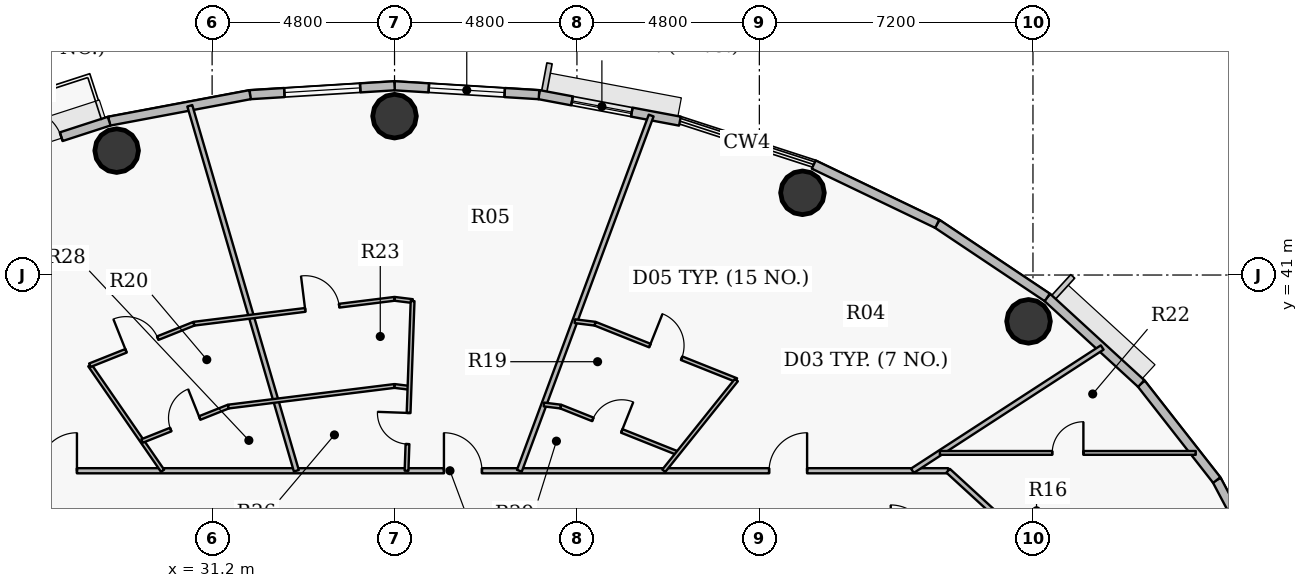
"""IFC4 building model, lengths in metres.
Left out: names, types, materials, properties, quantities, classifications, styles, units other than length and angle.
Written with IfcOpenShell. Run it as: python <this file> out.ifc"""

import sys

from ifc_helpers import new_model, si_unit, direction, frame, frame_2d, origin, origin_2d, place, context, subcontext, project, spatial, rectangle, hollow_circle, extrude, source, transform, mapped, element, fill, save


model = new_model("IFC4")
c1 = context("Model", 3, precision=1e-05, world=origin(), true_north=direction((0.0, 1.0)))
c2 = subcontext(c1, "Body", "Model", "MODEL_VIEW")
j1 = project(units=[si_unit("LENGTHUNIT", "METRE"), si_unit("PLANEANGLEUNIT", "RADIAN")], contexts=[c1])
p1 = place(None, origin())
s1 = spatial("IfcSite", under=j1, at=p1, CompositionType="ELEMENT")
p2 = place(p1, origin())
s2 = spatial("IfcBuilding", under=s1, at=p2, CompositionType="ELEMENT")
p3 = place(p2, frame((0.0, 0.0, 217.8)))
s3 = spatial("IfcBuildingStorey", under=s2, at=p3, CompositionType="ELEMENT", Elevation=217.8)
for number, where, z_axis, x_axis in (
    (1, (52.683, 39.781, 0.0), (0.0, 0.0, 1.0), (1.0, 0.0, 0.0)),
    (2, (46.735, 43.164, 0.0), (0.0, 0.0, 1.0), (1.0, 0.0, 0.0)),
    (3, (36.0, 45.18, 0.0), (0.0, 0.0, 1.0), (1.0, 0.0, 0.0)),
    (4, (28.688, 44.273, 0.0), (0.0, 0.0, 1.0), (1.0, 0.0, 0.0)),
):
    element("IfcColumn", number, at=place(p3, frame(where, z_axis=z_axis, x_axis=x_axis)), inside=s3, PredefinedType="COLUMN", context=c2, shape_type="SweptSolid", body=[
        extrude(hollow_circle(Radius=0.575, WallThickness=0.036, at=origin_2d()), origin(), (0.0, 0.0, 1.0), 3.75),
    ])
p4 = place(p3, frame((57.636, 35.605, 0.0), z_axis=(0.0, 0.0, 1.0), x_axis=(0.46766049993, -0.883908172157, 0.0)))
e5 = element("IfcWall", 5, at=p4, inside=s3, PredefinedType="SOLIDWALL", context=c2, shape_type="SweptSolid", body=[
    extrude(rectangle(XDim=3.11, YDim=0.24, at=frame_2d((1.555, 0.0))), origin(), (0.0, 0.0, 1.0), 3.5),
])
p5 = place(p3, frame((55.648, 38.145, 0.0), z_axis=(0.0, 0.0, 1.0), x_axis=(0.616312344705, -0.787501805562, 0.0)))
e6 = element("IfcWall", 6, at=p5, inside=s3, PredefinedType="SOLIDWALL", context=c2, shape_type="SweptSolid", body=[
    extrude(rectangle(XDim=3.225, YDim=0.24, at=frame_2d((1.612, 0.0))), origin(), (0.0, 0.0, 1.0), 3.5),
])
p6 = place(p3, frame((53.176, 40.411, 0.0), z_axis=(0.0, 0.0, 1.0), x_axis=(0.737123922599, -0.675757591694, 0.0)))
e7 = element("IfcWall", 7, at=p6, inside=s3, PredefinedType="SOLIDWALL", context=c2, shape_type="SweptSolid", body=[
    extrude(rectangle(XDim=3.354, YDim=0.24, at=frame_2d((1.677, 0.0))), origin(), (0.0, 0.0, 1.0), 3.5),
])
p7 = place(p3, frame((50.28, 42.348, 0.0), z_axis=(0.0, 0.0, 1.0), x_axis=(0.831262496074, -0.555880079352, 0.0)))
e8 = element("IfcWall", 8, at=p7, inside=s3, PredefinedType="SOLIDWALL", context=c2, shape_type="SweptSolid", body=[
    extrude(rectangle(XDim=3.484, YDim=0.24, at=frame_2d((1.742, 0.0))), origin(), (0.0, 0.0, 1.0), 3.5),
])
p8 = place(p3, frame((47.031, 43.906, 0.0), z_axis=(0.0, 0.0, 1.0), x_axis=(0.901598104751, -0.432574684313, 0.0)))
e9 = element("IfcWall", 9, at=p8, inside=s3, PredefinedType="SOLIDWALL", context=c2, shape_type="SweptSolid", body=[
    extrude(rectangle(XDim=3.604, YDim=0.24, at=frame_2d((1.802, 0.0))), origin(), (0.0, 0.0, 1.0), 3.5),
])
p9 = place(p3, frame((39.802, 45.746, 0.0), z_axis=(0.0, 0.0, 1.0), x_axis=(0.982784898575, -0.184753465822, 0.0)))
e10 = element("IfcWall", 10, at=p9, inside=s3, PredefinedType="SOLIDWALL", context=c2, shape_type="SweptSolid", body=[
    extrude(rectangle(XDim=3.773, YDim=0.24, at=frame_2d((1.886, 0.0))), origin(), (0.0, 0.0, 1.0), 3.5),
])
p10 = place(p9, frame((0.884, 0.0, 0.9)))
e11 = element("IfcOpeningElement", 11, at=p10, cuts=e10, PredefinedType="OPENING", context=c2, shape_type="SweptSolid", body=[
    extrude(rectangle(XDim=1.6, YDim=1.75, at=origin_2d()), frame((0.8, 0.13, 0.875), z_axis=(0.0, -1.0, 0.0), x_axis=(1.0, 0.0, 0.0)), (0.0, 0.0, 1.0), 0.26),
])
p11 = place(p3, frame((36.0, 45.98, 0.0), z_axis=(0.0, 0.0, 1.0), x_axis=(0.998108785312, -0.06147237333, 0.0)))
e12 = element("IfcWall", 12, at=p11, inside=s3, PredefinedType="SOLIDWALL", context=c2, shape_type="SweptSolid", body=[
    extrude(rectangle(XDim=3.809, YDim=0.24, at=frame_2d((1.904, 0.0))), origin(), (0.0, 0.0, 1.0), 3.5),
])
p12 = place(p11, frame((0.904, 0.0, 0.9)))
e13 = element("IfcOpeningElement", 13, at=p12, cuts=e12, PredefinedType="OPENING", context=c2, shape_type="SweptSolid", body=[
    extrude(rectangle(XDim=2.0, YDim=1.75, at=origin_2d()), frame((1.0, 0.13, 0.875), z_axis=(0.0, -1.0, 0.0), x_axis=(1.0, 0.0, 0.0)), (0.0, 0.0, 1.0), 0.26),
])
p13 = place(p3, frame((32.198, 45.746, 0.0), z_axis=(0.0, 0.0, 1.0), x_axis=(0.998108785312, 0.06147237333, 0.0)))
e14 = element("IfcWall", 14, at=p13, inside=s3, PredefinedType="SOLIDWALL", context=c2, shape_type="SweptSolid", body=[
    extrude(rectangle(XDim=3.809, YDim=0.24, at=frame_2d((1.904, 0.0))), origin(), (0.0, 0.0, 1.0), 3.5),
])
p14 = place(p13, frame((0.905, 0.0, 0.9)))
e15 = element("IfcOpeningElement", 15, at=p14, cuts=e14, PredefinedType="OPENING", context=c2, shape_type="SweptSolid", body=[
    extrude(rectangle(XDim=2.0, YDim=1.75, at=origin_2d()), frame((1.0, 0.13, 0.875), z_axis=(0.0, -1.0, 0.0), x_axis=(1.0, 0.0, 0.0)), (0.0, 0.0, 1.0), 0.26),
])
p15 = place(p3, frame((28.491, 45.049, 0.0), z_axis=(0.0, 0.0, 1.0), x_axis=(0.982784898575, 0.184753465822, 0.0)))
e16 = element("IfcWall", 16, at=p15, inside=s3, PredefinedType="SOLIDWALL", context=c2, shape_type="SweptSolid", body=[
    extrude(rectangle(XDim=3.773, YDim=0.24, at=frame_2d((1.886, 0.0))), origin(), (0.0, 0.0, 1.0), 3.5),
])
p16 = place(p3, frame((24.969, 43.906, 0.0), z_axis=(0.0, 0.0, 1.0), x_axis=(0.951210789182, 0.308541787354, 0.0)))
e17 = element("IfcWall", 17, at=p16, inside=s3, PredefinedType="SOLIDWALL", context=c2, shape_type="SweptSolid", body=[
    extrude(rectangle(XDim=3.702, YDim=0.24, at=frame_2d((1.851, 0.0))), origin(), (0.0, 0.0, 1.0), 3.5),
])
p17 = place(p16, frame((1.326, 0.0, 0.0)))
e18 = element("IfcOpeningElement", 18, at=p17, cuts=e17, PredefinedType="OPENING", context=c2, shape_type="SweptSolid", body=[
    extrude(rectangle(XDim=1.05, YDim=2.15, at=origin_2d()), frame((0.525, 0.13, 1.075), z_axis=(0.0, -1.0, 0.0), x_axis=(1.0, 0.0, 0.0)), (0.0, 0.0, 1.0), 0.26),
])
p18 = place(p3, frame((24.35, 35.85, 0.0), z_axis=(0.0, 0.0, 1.0), x_axis=(1.0, 0.0, 0.0)))
e19 = element("IfcWall", 19, at=p18, inside=s3, PredefinedType="PARTITIONING", context=c2, shape_type="SweptSolid", body=[
    extrude(rectangle(XDim=26.218, YDim=0.135, at=frame_2d((13.109, 0.0))), origin(), (0.0, 0.0, 1.0), 2.935),
])
p19 = place(p18, frame((21.507, 0.0, 0.0)))
e20 = element("IfcOpeningElement", 20, at=p19, cuts=e19, PredefinedType="OPENING", context=c2, shape_type="SweptSolid", body=[
    extrude(rectangle(XDim=1.0, YDim=2.15, at=origin_2d()), frame((0.5, 0.078, 1.075), z_axis=(0.0, -1.0, 0.0), x_axis=(1.0, 0.0, 0.0)), (0.0, 0.0, 1.0), 0.155),
])
p20 = place(p18, frame((12.95, 0.0, 0.0)))
e21 = element("IfcOpeningElement", 21, at=p20, cuts=e19, PredefinedType="OPENING", context=c2, shape_type="SweptSolid", body=[
    extrude(rectangle(XDim=1.0, YDim=2.15, at=origin_2d()), frame((0.5, 0.078, 1.075), z_axis=(0.0, -1.0, 0.0), x_axis=(1.0, 0.0, 0.0)), (0.0, 0.0, 1.0), 0.155),
])
p21 = place(p18, frame((2.293, 0.0, 0.0)))
e22 = element("IfcOpeningElement", 22, at=p21, cuts=e19, PredefinedType="OPENING", context=c2, shape_type="SweptSolid", body=[
    extrude(rectangle(XDim=1.0, YDim=2.15, at=origin_2d()), frame((0.5, 0.078, 1.075), z_axis=(0.0, -1.0, 0.0), x_axis=(1.0, 0.0, 0.0)), (0.0, 0.0, 1.0), 0.155),
])
p22 = place(p3, frame((27.982, 38.626, 0.0), z_axis=(0.0, 0.0, 1.0), x_axis=(0.56776340906, -0.823191782838, 0.0)))
e23 = element("IfcWall", 23, at=p22, inside=s3, PredefinedType="PARTITIONING", context=c2, shape_type="SweptSolid", body=[
    extrude(rectangle(XDim=3.372, YDim=0.1, at=frame_2d((1.686, 0.0))), origin(), (0.0, 0.0, 1.0), 3.5),
])
p23 = place(p3, frame((27.982, 38.626, 0.0), z_axis=(0.0, 0.0, 1.0), x_axis=(0.928795965169, 0.370591493542, 0.0)))
e24 = element("IfcWall", 24, at=p23, inside=s3, PredefinedType="PARTITIONING", context=c2, shape_type="SweptSolid", body=[
    extrude(rectangle(XDim=2.95, YDim=0.1, at=frame_2d((1.475, 0.0))), origin(), (0.0, 0.0, 1.0), 2.935),
])
p24 = place(p23, frame((1.025, 0.0, 0.0)))
e25 = element("IfcOpeningElement", 25, at=p24, cuts=e24, PredefinedType="OPENING", context=c2, shape_type="SweptSolid", body=[
    extrude(rectangle(XDim=0.9, YDim=2.1, at=origin_2d()), frame((0.45, 0.06, 1.05), z_axis=(0.0, -1.0, 0.0), x_axis=(1.0, 0.0, 0.0)), (0.0, 0.0, 1.0), 0.12),
])
p25 = place(p3, frame((29.356, 36.633, 0.0), z_axis=(0.0, 0.0, 1.0), x_axis=(0.928806968298, 0.370563915731, 0.0)))
e26 = element("IfcWall", 26, at=p25, inside=s3, PredefinedType="PARTITIONING", context=c2, shape_type="SweptSolid", body=[
    extrude(rectangle(XDim=2.444, YDim=0.1, at=frame_2d((1.222, 0.0))), origin(), (0.0, 0.0, 1.0), 2.935),
])
p26 = place(p25, frame((0.812, 0.0, 0.0)))
e27 = element("IfcOpeningElement", 27, at=p26, cuts=e26, PredefinedType="OPENING", context=c2, shape_type="SweptSolid", body=[
    extrude(rectangle(XDim=0.82, YDim=2.1, at=origin_2d()), frame((0.41, 0.06, 1.05), z_axis=(0.0, -1.0, 0.0), x_axis=(1.0, 0.0, 0.0)), (0.0, 0.0, 1.0), 0.12),
])
p27 = place(p3, frame((30.613, 45.453, 0.0), z_axis=(0.0, 0.0, 1.0), x_axis=(0.280222100614, -0.959935192775, 0.0)))
e28 = element("IfcWall", 28, at=p27, inside=s3, PredefinedType="PARTITIONING", context=c2, shape_type="SweptSolid", body=[
    extrude(rectangle(XDim=10.004, YDim=0.135, at=frame_2d((5.002, 0.0))), origin(), (0.0, 0.0, 1.0), 2.985),
])
p28 = place(p3, frame((30.722, 39.719, 0.0), z_axis=(0.0, 0.0, 1.0), x_axis=(0.992398169186, 0.123068573551, 0.0)))
e29 = element("IfcWall", 29, at=p28, inside=s3, PredefinedType="PARTITIONING", context=c2, shape_type="SweptSolid", body=[
    extrude(rectangle(XDim=5.319, YDim=0.1, at=frame_2d((2.659, 0.0))), origin(), (0.0, 0.0, 1.0), 2.935),
])
p29 = place(p28, frame((2.95, 0.0, 0.0)))
e30 = element("IfcOpeningElement", 30, at=p29, cuts=e29, PredefinedType="OPENING", context=c2, shape_type="SweptSolid", body=[
    extrude(rectangle(XDim=0.9, YDim=2.1, at=origin_2d()), frame((0.45, 0.06, 1.05), z_axis=(0.0, -1.0, 0.0), x_axis=(1.0, 0.0, 0.0)), (0.0, 0.0, 1.0), 0.12),
])
p30 = place(p3, frame((31.627, 37.539, 0.0), z_axis=(0.0, 0.0, 1.0), x_axis=(0.992401810072, 0.123039210683, 0.0)))
e31 = element("IfcWall", 31, at=p30, inside=s3, PredefinedType="PARTITIONING", context=c2, shape_type="SweptSolid", body=[
    extrude(rectangle(XDim=4.407, YDim=0.1, at=frame_2d((2.204, 0.0))), origin(), (0.0, 0.0, 1.0), 2.935),
])
p31 = place(p3, frame((36.0, 38.081, 0.0), z_axis=(0.0, 0.0, 1.0), x_axis=(0.99240043869, -0.123050271381, 0.0)))
e32 = element("IfcWall", 32, at=p31, inside=s3, PredefinedType="PARTITIONING", context=c2, shape_type="SweptSolid", body=[
    extrude(rectangle(XDim=0.397, YDim=0.1, at=frame_2d((0.198, 0.0))), origin(), (0.0, 0.0, 1.0), 2.935),
])
p32 = place(p3, frame((36.0, 40.374, 0.0), z_axis=(0.0, 0.0, 1.0), x_axis=(0.992363891793, -0.123344664517, 0.0)))
e33 = element("IfcWall", 33, at=p32, inside=s3, PredefinedType="PARTITIONING", context=c2, shape_type="SweptSolid", body=[
    extrude(rectangle(XDim=0.479, YDim=0.1, at=frame_2d((0.24, 0.0))), origin(), (0.0, 0.0, 1.0), 2.935),
])
p33 = place(p3, frame((36.316, 35.85, 0.0), z_axis=(0.0, 0.0, 1.0), x_axis=(0.035687631784, 0.99936299358, 0.0)))
e34 = element("IfcWall", 34, at=p33, inside=s3, PredefinedType="PARTITIONING", context=c2, shape_type="SweptSolid", body=[
    extrude(rectangle(XDim=4.467, YDim=0.1, at=frame_2d((2.234, 0.0))), origin(), (0.0, 0.0, 1.0), 3.5),
])
p34 = place(p33, frame((0.702, 0.0, 0.0)))
e35 = element("IfcOpeningElement", 35, at=p34, cuts=e34, PredefinedType="OPENING", context=c2, shape_type="SweptSolid", body=[
    extrude(rectangle(XDim=0.82, YDim=2.1, at=origin_2d()), frame((0.41, 0.06, 1.05), z_axis=(0.0, -1.0, 0.0), x_axis=(1.0, 0.0, 0.0)), (0.0, 0.0, 1.0), 0.12),
])
p35 = place(p3, frame((39.285, 35.85, 0.0), z_axis=(0.0, 0.0, 1.0), x_axis=(0.347978689674, 0.937502443481, 0.0)))
e36 = element("IfcWall", 36, at=p35, inside=s3, PredefinedType="PARTITIONING", context=c2, shape_type="SweptSolid", body=[
    extrude(rectangle(XDim=9.969, YDim=0.135, at=frame_2d((4.984, 0.0))), origin(), (0.0, 0.0, 1.0), 2.985),
])
p36 = place(p3, frame((39.932, 37.593, 0.0), z_axis=(0.0, 0.0, 1.0), x_axis=(0.992412401992, -0.122953748919, 0.0)))
e37 = element("IfcWall", 37, at=p36, inside=s3, PredefinedType="PARTITIONING", context=c2, shape_type="SweptSolid", body=[
    extrude(rectangle(XDim=0.445, YDim=0.1, at=frame_2d((0.222, 0.0))), origin(), (0.0, 0.0, 1.0), 3.5),
])
p37 = place(p3, frame((40.373, 37.539, 0.0), z_axis=(0.0, 0.0, 1.0), x_axis=(0.928801257211, -0.370578230071, 0.0)))
e38 = element("IfcWall", 38, at=p37, inside=s3, PredefinedType="PARTITIONING", context=c2, shape_type="SweptSolid", body=[
    extrude(rectangle(XDim=3.316, YDim=0.1, at=frame_2d((1.658, 0.0))), origin(), (0.0, 0.0, 1.0), 2.935),
])
p38 = place(p37, frame((0.91, 0.0, 0.0)))
e39 = element("IfcOpeningElement", 39, at=p38, cuts=e38, PredefinedType="OPENING", context=c2, shape_type="SweptSolid", body=[
    extrude(rectangle(XDim=0.82, YDim=2.1, at=origin_2d()), frame((0.41, 0.06, 1.05), z_axis=(0.0, -1.0, 0.0), x_axis=(1.0, 0.0, 0.0)), (0.0, 0.0, 1.0), 0.12),
])
p39 = place(p3, frame((40.745, 39.785, 0.0), z_axis=(0.0, 0.0, 1.0), x_axis=(0.992431053699, -0.122803109303, 0.0)))
e40 = element("IfcWall", 40, at=p39, inside=s3, PredefinedType="PARTITIONING", context=c2, shape_type="SweptSolid", body=[
    extrude(rectangle(XDim=0.537, YDim=0.1, at=frame_2d((0.269, 0.0))), origin(), (0.0, 0.0, 1.0), 3.5),
])
p40 = place(p3, frame((41.278, 39.719, 0.0), z_axis=(0.0, 0.0, 1.0), x_axis=(0.928808650267, -0.3705596999, 0.0)))
e41 = element("IfcWall", 41, at=p40, inside=s3, PredefinedType="PARTITIONING", context=c2, shape_type="SweptSolid", body=[
    extrude(rectangle(XDim=4.002, YDim=0.1, at=frame_2d((2.001, 0.0))), origin(), (0.0, 0.0, 1.0), 2.935),
])
p41 = place(p40, frame((1.551, 0.0, 0.0)))
e42 = element("IfcOpeningElement", 42, at=p41, cuts=e41, PredefinedType="OPENING", context=c2, shape_type="SweptSolid", body=[
    extrude(rectangle(XDim=0.9, YDim=2.1, at=origin_2d()), frame((0.45, 0.06, 1.05), z_axis=(0.0, -1.0, 0.0), x_axis=(1.0, 0.0, 0.0)), (0.0, 0.0, 1.0), 0.12),
])
p42 = place(p3, frame((43.085, 35.85, 0.0), z_axis=(0.0, 0.0, 1.0), x_axis=(0.62500673738, 0.780619355531, 0.0)))
e43 = element("IfcWall", 43, at=p42, inside=s3, PredefinedType="PARTITIONING", context=c2, shape_type="SweptSolid", body=[
    extrude(rectangle(XDim=3.056, YDim=0.1, at=frame_2d((1.528, 0.0))), origin(), (0.0, 0.0, 1.0), 3.5),
])
p43 = place(p3, frame((49.628, 35.85, 0.0), z_axis=(0.0, 0.0, 1.0), x_axis=(0.838688976762, 0.544610686875, 0.0)))
e44 = element("IfcWall", 44, at=p43, inside=s3, PredefinedType="PARTITIONING", context=c2, shape_type="SweptSolid", body=[
    extrude(rectangle(XDim=5.954, YDim=0.135, at=frame_2d((2.977, 0.0))), origin(), (0.0, 0.0, 1.0), 2.985),
])
p44 = place(p3, frame((50.351, 36.319, 0.0), z_axis=(0.0, 0.0, 1.0), x_axis=(1.0, 0.0, 0.0)))
e45 = element("IfcWall", 45, at=p44, inside=s3, PredefinedType="PARTITIONING", context=c2, shape_type="SweptSolid", body=[
    extrude(rectangle(XDim=6.733, YDim=0.1, at=frame_2d((3.366, 0.0))), origin(), (0.0, 0.0, 1.0), 2.985),
])
p45 = place(p44, frame((2.956, 0.0, 0.0)))
e46 = element("IfcOpeningElement", 46, at=p45, cuts=e45, PredefinedType="OPENING", context=c2, shape_type="SweptSolid", body=[
    extrude(rectangle(XDim=0.82, YDim=2.1, at=origin_2d()), frame((0.41, 0.06, 1.05), z_axis=(0.0, -1.0, 0.0), x_axis=(1.0, 0.0, 0.0)), (0.0, 0.0, 1.0), 0.12),
])
p46 = place(p3, frame((50.568, 35.85, 0.0), z_axis=(0.0, 0.0, 1.0), x_axis=(0.737102657331, -0.675780787353, 0.0)))
e47 = element("IfcWall", 47, at=p46, inside=s3, PredefinedType="PARTITIONING", context=c2, shape_type="SweptSolid", body=[
    extrude(rectangle(XDim=1.772, YDim=0.135, at=frame_2d((0.886, 0.0))), origin(), (0.0, 0.0, 1.0), 3.5),
])
m1 = source(origin(), c2, "Body", "SweptSolid", [
    extrude(rectangle(XDim=1.6, YDim=1.75, at=origin_2d()), frame((0.8, 0.03, 0.875), z_axis=(0.0, -1.0, 0.0), x_axis=(1.0, 0.0, 0.0)), (0.0, 0.0, 1.0), 0.06),
])
p47 = place(p10, origin())
e48 = element("IfcWindow", 48, at=p47, inside=s3, PartitioningType="DOUBLE_PANEL_VERTICAL", PredefinedType="WINDOW", context=c2, shape_type="MappedRepresentation", body=[
    mapped(m1, transform((0.0, 0.0, 0.0), x_axis=(1.0, 0.0, 0.0), y_axis=(0.0, 1.0, 0.0), z_axis=(0.0, 0.0, 1.0), scale=1.0)),
])
fill(e11, e48)
m2 = source(origin(), c2, "Body", "SweptSolid", [
    extrude(rectangle(XDim=2.0, YDim=1.75, at=origin_2d()), frame((1.0, 0.03, 0.875), z_axis=(0.0, -1.0, 0.0), x_axis=(1.0, 0.0, 0.0)), (0.0, 0.0, 1.0), 0.06),
])
p48 = place(p12, origin())
e49 = element("IfcWindow", 49, at=p48, inside=s3, PartitioningType="DOUBLE_PANEL_VERTICAL", PredefinedType="WINDOW", context=c2, shape_type="MappedRepresentation", body=[
    mapped(m2, transform((0.0, 0.0, 0.0), x_axis=(1.0, 0.0, 0.0), y_axis=(0.0, 1.0, 0.0), z_axis=(0.0, 0.0, 1.0), scale=1.0)),
])
fill(e13, e49)
p49 = place(p14, origin())
e50 = element("IfcWindow", 50, at=p49, inside=s3, PartitioningType="DOUBLE_PANEL_VERTICAL", PredefinedType="WINDOW", context=c2, shape_type="MappedRepresentation", body=[
    mapped(m2, transform((0.0, 0.0, 0.0), x_axis=(1.0, 0.0, 0.0), y_axis=(0.0, 1.0, 0.0), z_axis=(0.0, 0.0, 1.0), scale=1.0)),
])
fill(e15, e50)
m3 = source(origin(), c2, "Body", "SweptSolid", [
    extrude(rectangle(XDim=1.05, YDim=2.15, at=origin_2d()), frame((0.525, 0.025, 1.075), z_axis=(0.0, -1.0, 0.0), x_axis=(1.0, 0.0, 0.0)), (0.0, 0.0, 1.0), 0.05),
])
p50 = place(p17, origin())
e51 = element("IfcDoor", 51, at=p50, inside=s3, OperationType="SINGLE_SWING_LEFT", PredefinedType="DOOR", context=c2, shape_type="MappedRepresentation", body=[
    mapped(m3, transform((0.0, 0.0, 0.0), x_axis=(1.0, 0.0, 0.0), y_axis=(0.0, 1.0, 0.0), z_axis=(0.0, 0.0, 1.0), scale=1.0)),
])
fill(e18, e51)
m4 = source(origin(), c2, "Body", "SweptSolid", [
    extrude(rectangle(XDim=1.0, YDim=2.15, at=origin_2d()), frame((0.5, 0.025, 1.075), z_axis=(0.0, -1.0, 0.0), x_axis=(1.0, 0.0, 0.0)), (0.0, 0.0, 1.0), 0.05),
])
p51 = place(p19, origin())
e52 = element("IfcDoor", 52, at=p51, inside=s3, OperationType="SINGLE_SWING_RIGHT", PredefinedType="DOOR", context=c2, shape_type="MappedRepresentation", body=[
    mapped(m4, transform((0.0, 0.0, 0.0), x_axis=(1.0, 0.0, 0.0), y_axis=(0.0, 1.0, 0.0), z_axis=(0.0, 0.0, 1.0), scale=1.0)),
])
fill(e20, e52)
m5 = source(origin(), c2, "Body", "SweptSolid", [
    extrude(rectangle(XDim=0.9, YDim=2.1, at=origin_2d()), frame((0.45, 0.025, 1.05), z_axis=(0.0, -1.0, 0.0), x_axis=(1.0, 0.0, 0.0)), (0.0, 0.0, 1.0), 0.05),
])
p52 = place(p41, origin())
e53 = element("IfcDoor", 53, at=p52, inside=s3, OperationType="SINGLE_SWING_LEFT", PredefinedType="DOOR", context=c2, shape_type="MappedRepresentation", body=[
    mapped(m5, transform((0.0, 0.0, 0.0), x_axis=(1.0, 0.0, 0.0), y_axis=(0.0, 1.0, 0.0), z_axis=(0.0, 0.0, 1.0), scale=1.0)),
])
fill(e42, e53)
m6 = source(origin(), c2, "Body", "SweptSolid", [
    extrude(rectangle(XDim=0.82, YDim=2.1, at=origin_2d()), frame((0.41, 0.025, 1.05), z_axis=(0.0, -1.0, 0.0), x_axis=(1.0, 0.0, 0.0)), (0.0, 0.0, 1.0), 0.05),
])
p53 = place(p38, origin())
e54 = element("IfcDoor", 54, at=p53, inside=s3, OperationType="SINGLE_SWING_RIGHT", PredefinedType="DOOR", context=c2, shape_type="MappedRepresentation", body=[
    mapped(m6, transform((0.0, 0.0, 0.0), x_axis=(1.0, 0.0, 0.0), y_axis=(0.0, 1.0, 0.0), z_axis=(0.0, 0.0, 1.0), scale=1.0)),
])
fill(e39, e54)
p54 = place(p20, origin())
e55 = element("IfcDoor", 55, at=p54, inside=s3, OperationType="SINGLE_SWING_LEFT", PredefinedType="DOOR", context=c2, shape_type="MappedRepresentation", body=[
    mapped(m4, transform((0.0, 0.0, 0.0), x_axis=(1.0, 0.0, 0.0), y_axis=(0.0, 1.0, 0.0), z_axis=(0.0, 0.0, 1.0), scale=1.0)),
])
fill(e21, e55)
p55 = place(p34, origin())
e56 = element("IfcDoor", 56, at=p55, inside=s3, OperationType="SINGLE_SWING_RIGHT", PredefinedType="DOOR", context=c2, shape_type="MappedRepresentation", body=[
    mapped(m6, transform((0.0, 0.0, 0.0), x_axis=(1.0, 0.0, 0.0), y_axis=(0.0, 1.0, 0.0), z_axis=(0.0, 0.0, 1.0), scale=1.0)),
])
fill(e35, e56)
p56 = place(p29, origin())
e57 = element("IfcDoor", 57, at=p56, inside=s3, OperationType="SINGLE_SWING_LEFT", PredefinedType="DOOR", context=c2, shape_type="MappedRepresentation", body=[
    mapped(m5, transform((0.0, 0.0, 0.0), x_axis=(1.0, 0.0, 0.0), y_axis=(0.0, 1.0, 0.0), z_axis=(0.0, 0.0, 1.0), scale=1.0)),
])
fill(e30, e57)
p57 = place(p21, origin())
e58 = element("IfcDoor", 58, at=p57, inside=s3, OperationType="SINGLE_SWING_RIGHT", PredefinedType="DOOR", context=c2, shape_type="MappedRepresentation", body=[
    mapped(m4, transform((0.0, 0.0, 0.0), x_axis=(1.0, 0.0, 0.0), y_axis=(0.0, 1.0, 0.0), z_axis=(0.0, 0.0, 1.0), scale=1.0)),
])
fill(e22, e58)
p58 = place(p24, origin())
e59 = element("IfcDoor", 59, at=p58, inside=s3, OperationType="SINGLE_SWING_LEFT", PredefinedType="DOOR", context=c2, shape_type="MappedRepresentation", body=[
    mapped(m5, transform((0.0, 0.0, 0.0), x_axis=(1.0, 0.0, 0.0), y_axis=(0.0, 1.0, 0.0), z_axis=(0.0, 0.0, 1.0), scale=1.0)),
])
fill(e25, e59)
p59 = place(p26, origin())
e60 = element("IfcDoor", 60, at=p59, inside=s3, OperationType="SINGLE_SWING_RIGHT", PredefinedType="DOOR", context=c2, shape_type="MappedRepresentation", body=[
    mapped(m6, transform((0.0, 0.0, 0.0), x_axis=(1.0, 0.0, 0.0), y_axis=(0.0, 1.0, 0.0), z_axis=(0.0, 0.0, 1.0), scale=1.0)),
])
fill(e27, e60)
p60 = place(p45, origin())
e61 = element("IfcDoor", 61, at=p60, inside=s3, OperationType="SINGLE_SWING_RIGHT", PredefinedType="DOOR", context=c2, shape_type="MappedRepresentation", body=[
    mapped(m6, transform((0.0, 0.0, 0.0), x_axis=(1.0, 0.0, 0.0), y_axis=(0.0, 1.0, 0.0), z_axis=(0.0, 0.0, 1.0), scale=1.0)),
])
fill(e46, e61)
save(model, sys.argv[1])
